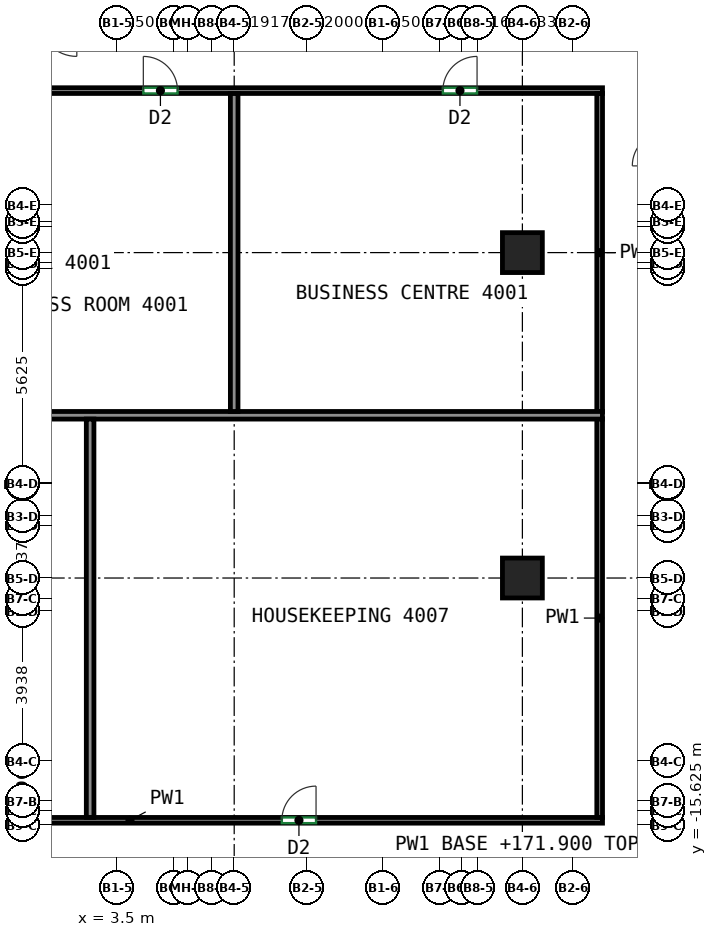
"""IFC4 building model, lengths in metres.
Left out: names, types, materials, properties, quantities, classifications, styles, units other than length and angle.
Written with IfcOpenShell. Run it as: python <this file> out.ifc"""

import sys

from ifc_helpers import new_model, si_unit, direction, frame, frame_2d, origin, origin_2d, place, context, subcontext, project, spatial, rectangle, extrude, source, transform, mapped, element, fill, save


model = new_model("IFC4")
c1 = context("Model", 3, precision=1e-05, world=origin(), true_north=direction((0.0, 1.0)))
c2 = subcontext(c1, "Body", "Model", "MODEL_VIEW")
j1 = project(units=[si_unit("LENGTHUNIT", "METRE"), si_unit("PLANEANGLEUNIT", "RADIAN")], contexts=[c1])
p1 = place(None, origin())
s1 = spatial("IfcSite", under=j1, at=p1, CompositionType="ELEMENT")
p2 = place(p1, origin())
s2 = spatial("IfcBuilding", under=s1, at=p2, CompositionType="ELEMENT")
p3 = place(p2, frame((0.0, 0.0, 171.9)))
s3 = spatial("IfcBuildingStorey", under=s2, at=p3, CompositionType="ELEMENT", Elevation=171.9)
m1 = source(origin(), c2, "Body", "SweptSolid", [
    extrude(rectangle(XDim=1.05, YDim=1.05, at=origin_2d()), origin(), (0.0, 0.0, 1.0), 3.12),
])
for number, where, z_axis, x_axis in (
    (1, (14.167, -9.125, 0.0), (0.0, 0.0, 1.0), (1.0, 0.0, 0.0)),
    (2, (14.167, -0.562, 0.0), (0.0, 0.0, 1.0), (1.0, 0.0, 0.0)),
):
    element("IfcColumn", number, at=place(p3, frame(where, z_axis=z_axis, x_axis=x_axis)), inside=s3, PredefinedType="COLUMN", context=c2, shape_type="MappedRepresentation", body=[
        mapped(m1, transform((0.0, 0.0, 0.0))),
    ])
p4 = place(p3, frame((-17.575, 3.7, 0.0), z_axis=(0.0, 0.0, 1.0), x_axis=(1.0, 0.0, 0.0)))
e3 = element("IfcWall", 3, at=p4, inside=s3, PredefinedType="PARTITIONING", context=c2, shape_type="SweptSolid", body=[
    extrude(rectangle(XDim=33.85, YDim=0.15, at=frame_2d((16.925, 0.0))), origin(), (0.0, 0.0, 1.0), 3.12),
])
p5 = place(p4, frame((6.596, 0.0, 0.0)))
e4 = element("IfcOpeningElement", 4, at=p5, cuts=e3, PredefinedType="OPENING", context=c2, shape_type="SweptSolid", body=[
    extrude(rectangle(XDim=0.9, YDim=2.1, at=frame_2d((0.45, 1.05))), frame((0.0, 0.085, 0.0), z_axis=(0.0, -1.0, 0.0), x_axis=(1.0, 0.0, 0.0)), (0.0, 0.0, 1.0), 0.17),
])
p6 = place(p4, frame((10.082, 0.0, 0.0)))
e5 = element("IfcOpeningElement", 5, at=p6, cuts=e3, PredefinedType="OPENING", context=c2, shape_type="SweptSolid", body=[
    extrude(rectangle(XDim=0.9, YDim=2.1, at=frame_2d((0.45, 1.05))), frame((0.0, 0.085, 0.0), z_axis=(0.0, -1.0, 0.0), x_axis=(1.0, 0.0, 0.0)), (0.0, 0.0, 1.0), 0.17),
])
p7 = place(p4, frame((21.767, 0.0, 0.0)))
e6 = element("IfcOpeningElement", 6, at=p7, cuts=e3, PredefinedType="OPENING", context=c2, shape_type="SweptSolid", body=[
    extrude(rectangle(XDim=0.9, YDim=2.1, at=frame_2d((0.45, 1.05))), frame((0.0, 0.085, 0.0), z_axis=(0.0, -1.0, 0.0), x_axis=(1.0, 0.0, 0.0)), (0.0, 0.0, 1.0), 0.17),
])
p8 = place(p4, frame((29.649, 0.0, 0.0)))
e7 = element("IfcOpeningElement", 7, at=p8, cuts=e3, PredefinedType="OPENING", context=c2, shape_type="SweptSolid", body=[
    extrude(rectangle(XDim=0.9, YDim=2.1, at=frame_2d((0.45, 1.05))), frame((0.0, 0.085, 0.0), z_axis=(0.0, -1.0, 0.0), x_axis=(1.0, 0.0, 0.0)), (0.0, 0.0, 1.0), 0.17),
])
p9 = place(p3, frame((16.2, -4.753, 0.0), z_axis=(0.0, 0.0, 1.0), x_axis=(0.0, 1.0, 0.0)))
e8 = element("IfcWall", 8, at=p9, inside=s3, PredefinedType="PARTITIONING", context=c2, shape_type="SweptSolid", body=[
    extrude(rectangle(XDim=8.378, YDim=0.15, at=frame_2d((4.189, 0.0))), origin(), (0.0, 0.0, 1.0), 3.12),
])
p10 = place(p3, frame((-8.593, -15.5, 0.0), z_axis=(0.0, 0.0, 1.0), x_axis=(1.0, 0.0, 0.0)))
e9 = element("IfcWall", 9, at=p10, inside=s3, PredefinedType="PARTITIONING", context=c2, shape_type="SweptSolid", body=[
    extrude(rectangle(XDim=24.868, YDim=0.15, at=frame_2d((12.434, 0.0))), origin(), (0.0, 0.0, 1.0), 3.12),
])
p11 = place(p10, frame((6.44, 0.0, 0.0)))
e10 = element("IfcOpeningElement", 10, at=p11, cuts=e9, PredefinedType="OPENING", context=c2, shape_type="SweptSolid", body=[
    extrude(rectangle(XDim=0.9, YDim=2.1, at=frame_2d((0.45, 1.05))), frame((0.0, 0.085, 0.0), z_axis=(0.0, -1.0, 0.0), x_axis=(1.0, 0.0, 0.0)), (0.0, 0.0, 1.0), 0.17),
])
p12 = place(p10, frame((16.43, 0.0, 0.0)))
e11 = element("IfcOpeningElement", 11, at=p12, cuts=e9, PredefinedType="OPENING", context=c2, shape_type="SweptSolid", body=[
    extrude(rectangle(XDim=0.9, YDim=2.1, at=frame_2d((0.45, 1.05))), frame((0.0, 0.085, 0.0), z_axis=(0.0, -1.0, 0.0), x_axis=(1.0, 0.0, 0.0)), (0.0, 0.0, 1.0), 0.17),
])
p13 = place(p3, frame((16.2, -15.425, 0.0), z_axis=(0.0, 0.0, 1.0), x_axis=(0.0, 1.0, 0.0)))
e12 = element("IfcWall", 12, at=p13, inside=s3, PredefinedType="PARTITIONING", context=c2, shape_type="SweptSolid", body=[
    extrude(rectangle(XDim=10.492, YDim=0.15, at=frame_2d((5.246, 0.0))), origin(), (0.0, 0.0, 1.0), 3.12),
])
p14 = place(p3, frame((-13.873, -4.843, 0.0), z_axis=(0.0, 0.0, 1.0), x_axis=(1.0, 0.0, 0.0)))
e13 = element("IfcWall", 13, at=p14, inside=s3, PredefinedType="PARTITIONING", context=c2, shape_type="SweptSolid", body=[
    extrude(rectangle(XDim=30.146, YDim=0.2, at=frame_2d((15.073, 0.0))), origin(), (0.0, 0.0, 1.0), 3.12),
])
p15 = place(p3, frame((6.583, -4.743, 0.0), z_axis=(0.0, 0.0, 1.0), x_axis=(0.0, 1.0, 0.0)))
e14 = element("IfcWall", 14, at=p15, inside=s3, PredefinedType="PARTITIONING", context=c2, shape_type="SweptSolid", body=[
    extrude(rectangle(XDim=8.366, YDim=0.2, at=frame_2d((4.183, 0.0))), origin(), (0.0, 0.0, 1.0), 3.12),
])
p16 = place(p3, frame((2.792, -15.423, 0.0), z_axis=(0.0, 0.0, 1.0), x_axis=(0.0, 1.0, 0.0)))
e15 = element("IfcWall", 15, at=p16, inside=s3, PredefinedType="PARTITIONING", context=c2, shape_type="SweptSolid", body=[
    extrude(rectangle(XDim=10.48, YDim=0.2, at=frame_2d((5.24, 0.0))), origin(), (0.0, 0.0, 1.0), 3.12),
])
p17 = place(p12, origin())
e16 = element("IfcDoor", 16, at=p17, inside=s3, OperationType="SINGLE_SWING_RIGHT", PredefinedType="DOOR", context=c2, shape_type="SweptSolid", body=[
    extrude(rectangle(XDim=0.9, YDim=2.1, at=frame_2d((0.45, 1.05))), frame((0.0, 0.025, 0.0), z_axis=(0.0, -1.0, 0.0), x_axis=(1.0, 0.0, 0.0)), (0.0, 0.0, 1.0), 0.05),
])
fill(e11, e16)
p18 = place(p7, origin())
e17 = element("IfcDoor", 17, at=p18, inside=s3, OperationType="SINGLE_SWING_LEFT", PredefinedType="DOOR", context=c2, shape_type="SweptSolid", body=[
    extrude(rectangle(XDim=0.9, YDim=2.1, at=frame_2d((0.45, 1.05))), frame((0.0, 0.025, 0.0), z_axis=(0.0, -1.0, 0.0), x_axis=(1.0, 0.0, 0.0)), (0.0, 0.0, 1.0), 0.05),
])
fill(e6, e17)
p19 = place(p8, origin())
e18 = element("IfcDoor", 18, at=p19, inside=s3, OperationType="SINGLE_SWING_RIGHT", PredefinedType="DOOR", context=c2, shape_type="SweptSolid", body=[
    extrude(rectangle(XDim=0.9, YDim=2.1, at=frame_2d((0.45, 1.05))), frame((0.0, 0.025, 0.0), z_axis=(0.0, -1.0, 0.0), x_axis=(1.0, 0.0, 0.0)), (0.0, 0.0, 1.0), 0.05),
])
fill(e7, e18)
save(model, sys.argv[1])
